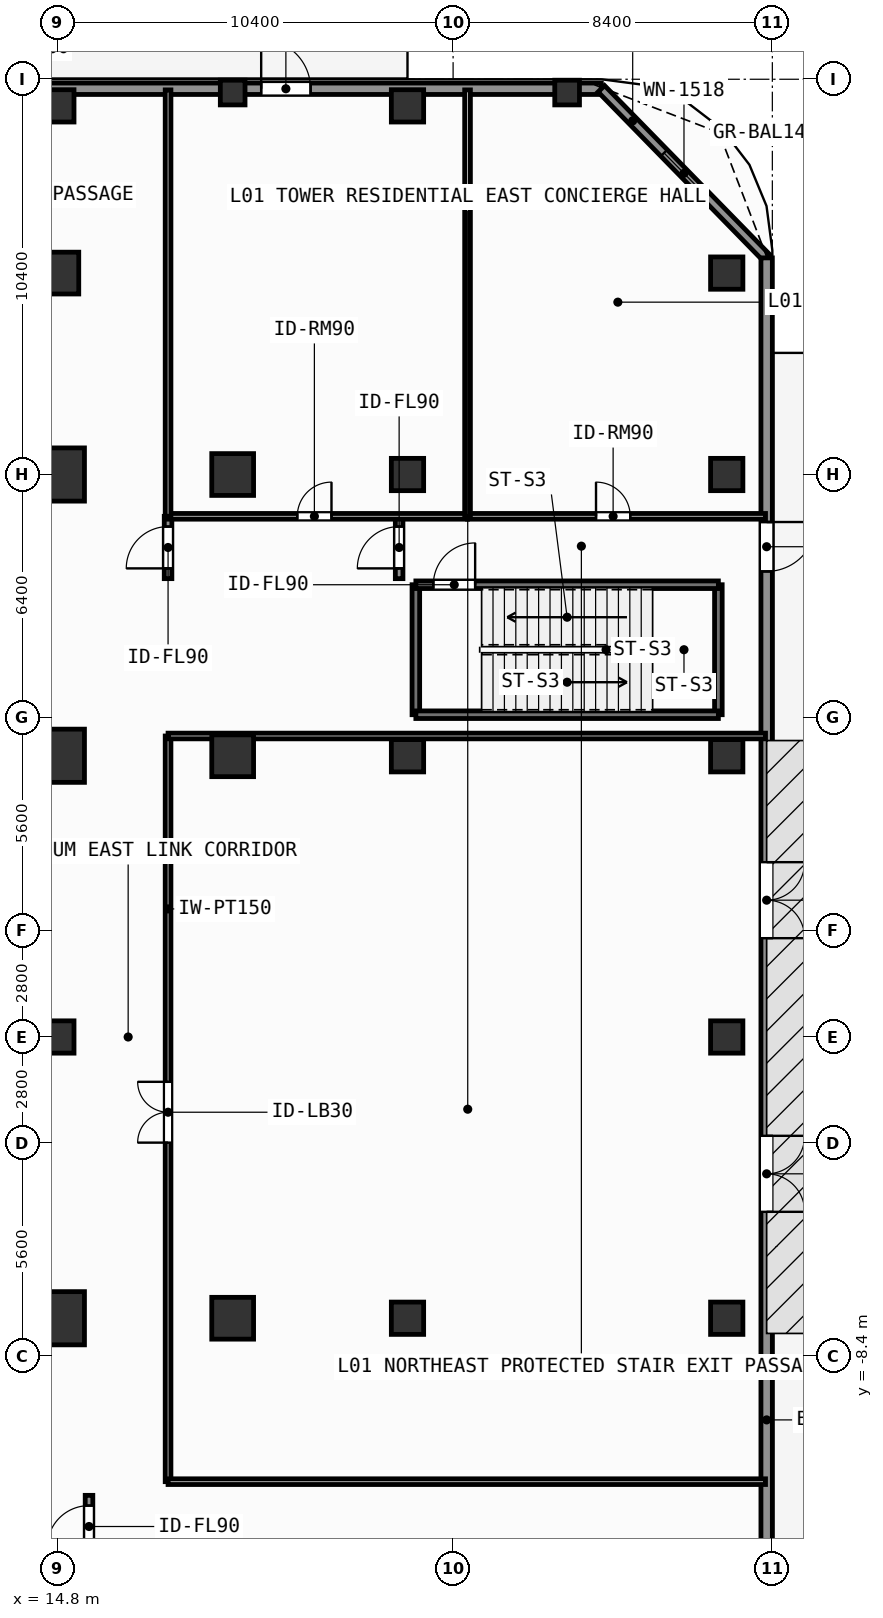
"""IFC4 building model, lengths in metres.
Left out: names, types, materials, properties, quantities, classifications, styles, units other than length and angle.
Written with IfcOpenShell. Run it as: python <this file> out.ifc"""

import sys

from ifc_helpers import new_model, si_unit, direction, frame, frame_2d, origin, origin_2d, place, context, subcontext, project, spatial, rectangle, extrude, element, fill, save


model = new_model("IFC4")
c1 = context("Model", 3, precision=1e-05, world=origin(), true_north=direction((0.0, 1.0)))
c2 = subcontext(c1, "Body", "Model", "MODEL_VIEW")
j1 = project(units=[si_unit("LENGTHUNIT", "METRE"), si_unit("PLANEANGLEUNIT", "RADIAN")], contexts=[c1])
p1 = place(None, origin())
s1 = spatial("IfcSite", under=j1, at=p1, CompositionType="ELEMENT")
p2 = place(p1, origin())
s2 = spatial("IfcBuilding", under=s1, at=p2, CompositionType="ELEMENT")
p3 = place(p2, origin())
s3 = spatial("IfcBuildingStorey", under=s2, at=p3, CompositionType="ELEMENT", Elevation=0.0)
for number, where, z_axis, x_axis in (
    (1, (14.8, 14.8, 0.0), (0.0, 0.0, 1.0), (1.0, 0.0, 0.0)),
    (2, (14.8, -7.4, 0.0), (0.0, 0.0, 1.0), (1.0, 0.0, 0.0)),
    (3, (14.8, 7.4, 0.0), (0.0, 0.0, 1.0), (1.0, 0.0, 0.0)),
):
    element("IfcColumn", number, at=place(p3, frame(where, z_axis=z_axis, x_axis=x_axis)), inside=s3, PredefinedType="COLUMN", context=c2, shape_type="SweptSolid", body=[
        extrude(rectangle(XDim=1.4, YDim=1.4, at=origin_2d()), origin(), (0.0, 0.0, 1.0), 4.8),
    ])
for number, where, z_axis, x_axis in (
    (4, (19.4, -7.4, 0.0), (0.0, 0.0, 1.0), (1.0, 0.0, 0.0)),
    (5, (19.4, 7.4, 0.0), (0.0, 0.0, 1.0), (1.0, 0.0, 0.0)),
    (6, (19.4, 14.8, 0.0), (0.0, 0.0, 1.0), (1.0, 0.0, 0.0)),
    (7, (14.8, 20.1, 0.0), (0.0, 0.0, 1.0), (1.0, 0.0, 0.0)),
):
    element("IfcColumn", number, at=place(p3, frame(where, z_axis=z_axis, x_axis=x_axis)), inside=s3, PredefinedType="COLUMN", context=c2, shape_type="SweptSolid", body=[
        extrude(rectangle(XDim=1.1, YDim=1.1, at=origin_2d()), origin(), (0.0, 0.0, 1.0), 4.8),
    ])
for number, where, z_axis, x_axis in (
    (8, (14.8, 0.0, 0.0), (0.0, 0.0, 1.0), (1.0, 0.0, 0.0)),
    (9, (14.8, 24.5, 0.0), (0.0, 0.0, 1.0), (1.0, 0.0, 0.0)),
    (10, (24.0, -7.4, 0.0), (0.0, 0.0, 1.0), (1.0, 0.0, 0.0)),
    (11, (24.0, 7.4, 0.0), (0.0, 0.0, 1.0), (1.0, 0.0, 0.0)),
    (12, (24.0, 14.8, 0.0), (0.0, 0.0, 1.0), (1.0, 0.0, 0.0)),
    (13, (24.0, 24.5, 0.0), (0.0, 0.0, 1.0), (1.0, 0.0, 0.0)),
    (14, (32.4, -7.4, 0.0), (0.0, 0.0, 1.0), (1.0, 0.0, 0.0)),
    (15, (32.4, 0.0, 0.0), (0.0, 0.0, 1.0), (1.0, 0.0, 0.0)),
    (16, (32.4, 7.4, 0.0), (0.0, 0.0, 1.0), (1.0, 0.0, 0.0)),
    (17, (32.4, 14.8, 0.0), (0.0, 0.0, 1.0), (1.0, 0.0, 0.0)),
    (18, (32.4, 20.1, 0.0), (0.0, 0.0, 1.0), (1.0, 0.0, 0.0)),
):
    element("IfcColumn", number, at=place(p3, frame(where, z_axis=z_axis, x_axis=x_axis)), inside=s3, PredefinedType="COLUMN", context=c2, shape_type="SweptSolid", body=[
        extrude(rectangle(XDim=0.85, YDim=0.85, at=origin_2d()), origin(), (0.0, 0.0, 1.0), 4.8),
    ])
for number, where, z_axis, x_axis in (
    (19, (19.4, 24.85, 0.0), (0.0, 0.0, 1.0), (1.0, 0.0, 0.0)),
    (20, (28.2, 24.85, 0.0), (0.0, 0.0, 1.0), (1.0, 0.0, 0.0)),
):
    element("IfcColumn", number, at=place(p3, frame(where, z_axis=z_axis, x_axis=x_axis)), inside=s3, PredefinedType="PILASTER", context=c2, shape_type="SweptSolid", body=[
        extrude(rectangle(XDim=0.65, YDim=0.65, at=origin_2d()), origin(), (0.0, 0.0, 1.0), 4.8),
    ])
p4 = place(p3, frame((-29.1, 24.95, 0.0), z_axis=(0.0, 0.0, 1.0), x_axis=(1.0, 0.0, 0.0)))
e21 = element("IfcWall", 21, at=p4, inside=s3, PredefinedType="SOLIDWALL", context=c2, shape_type="SweptSolid", body=[
    extrude(rectangle(XDim=58.2, YDim=0.3, at=frame_2d((29.1, 0.0))), origin(), (0.0, 0.0, 1.0), 4.56),
])
p5 = place(p4, frame((10.9, 0.0, 0.85)))
e22 = element("IfcOpeningElement", 22, at=p5, cuts=e21, PredefinedType="OPENING", context=c2, shape_type="SweptSolid", body=[
    extrude(rectangle(XDim=2.1, YDim=2.2, at=frame_2d((1.05, 1.1))), frame((0.0, 0.16, 0.0), z_axis=(0.0, -1.0, 0.0), x_axis=(1.0, 0.0, 0.0)), (0.0, 0.0, 1.0), 0.32),
])
p6 = place(p4, frame((16.95, 0.0, 0.85)))
e23 = element("IfcOpeningElement", 23, at=p6, cuts=e21, PredefinedType="OPENING", context=c2, shape_type="SweptSolid", body=[
    extrude(rectangle(XDim=2.1, YDim=2.2, at=frame_2d((1.05, 1.1))), frame((0.0, 0.16, 0.0), z_axis=(0.0, -1.0, 0.0), x_axis=(1.0, 0.0, 0.0)), (0.0, 0.0, 1.0), 0.32),
])
p7 = place(p4, frame((23.84, 0.0, 0.85)))
e24 = element("IfcOpeningElement", 24, at=p7, cuts=e21, PredefinedType="OPENING", context=c2, shape_type="SweptSolid", body=[
    extrude(rectangle(XDim=2.1, YDim=2.2, at=frame_2d((1.05, 1.1))), frame((0.0, 0.16, 0.0), z_axis=(0.0, -1.0, 0.0), x_axis=(1.0, 0.0, 0.0)), (0.0, 0.0, 1.0), 0.32),
])
p8 = place(p4, frame((30.44, 0.0, 0.85)))
e25 = element("IfcOpeningElement", 25, at=p8, cuts=e21, PredefinedType="OPENING", context=c2, shape_type="SweptSolid", body=[
    extrude(rectangle(XDim=2.1, YDim=2.2, at=frame_2d((1.05, 1.1))), frame((0.0, 0.16, 0.0), z_axis=(0.0, -1.0, 0.0), x_axis=(1.0, 0.0, 0.0)), (0.0, 0.0, 1.0), 0.32),
])
p9 = place(p4, frame((39.25, 0.0, 0.0)))
e26 = element("IfcOpeningElement", 26, at=p9, cuts=e21, PredefinedType="OPENING", context=c2, shape_type="SweptSolid", body=[
    extrude(rectangle(XDim=1.3, YDim=2.2, at=frame_2d((0.65, 1.1))), frame((0.0, 0.16, 0.0), z_axis=(0.0, -1.0, 0.0), x_axis=(1.0, 0.0, 0.0)), (0.0, 0.0, 1.0), 0.32),
])
p10 = place(p4, frame((49.25, 0.0, 0.0)))
e27 = element("IfcOpeningElement", 27, at=p10, cuts=e21, PredefinedType="OPENING", context=c2, shape_type="SweptSolid", body=[
    extrude(rectangle(XDim=1.3, YDim=2.2, at=frame_2d((0.65, 1.1))), frame((0.0, 0.16, 0.0), z_axis=(0.0, -1.0, 0.0), x_axis=(1.0, 0.0, 0.0)), (0.0, 0.0, 1.0), 0.32),
])
p11 = place(p3, frame((29.1, 24.95, 0.0), z_axis=(0.0, 0.0, 1.0), x_axis=(0.69901822973, -0.715103848756, 0.0)))
e28 = element("IfcWall", 28, at=p11, inside=s3, PredefinedType="SOLIDWALL", context=c2, shape_type="SweptSolid", body=[
    extrude(rectangle(XDim=6.223, YDim=0.24, at=frame_2d((3.111, 0.0))), origin(), (0.0, 0.0, 1.0), 4.56),
])
p12 = place(p11, frame((2.362, 0.0, 0.85)))
e29 = element("IfcOpeningElement", 29, at=p12, cuts=e28, PredefinedType="OPENING", context=c2, shape_type="SweptSolid", body=[
    extrude(rectangle(XDim=1.5, YDim=1.85, at=frame_2d((0.75, 0.925))), frame((0.0, 0.13, 0.0), z_axis=(0.0, -1.0, 0.0), x_axis=(1.0, 0.0, 0.0)), (0.0, 0.0, 1.0), 0.26),
])
p13 = place(p3, frame((33.45, 20.5, 0.0), z_axis=(0.0, 0.0, 1.0), x_axis=(0.0, -1.0, 0.0)))
e30 = element("IfcWall", 30, at=p13, inside=s3, PredefinedType="SOLIDWALL", context=c2, shape_type="SweptSolid", body=[
    extrude(rectangle(XDim=41.0, YDim=0.3, at=frame_2d((20.5, 0.0))), origin(), (0.0, 0.0, 1.0), 4.56),
])
p14 = place(p13, frame((23.1, 0.0, 0.0)))
e31 = element("IfcOpeningElement", 31, at=p14, cuts=e30, PredefinedType="OPENING", context=c2, shape_type="SweptSolid", body=[
    extrude(rectangle(XDim=2.0, YDim=2.4, at=frame_2d((1.0, 1.2))), frame((0.0, 0.16, 0.0), z_axis=(0.0, -1.0, 0.0), x_axis=(1.0, 0.0, 0.0)), (0.0, 0.0, 1.0), 0.32),
])
p15 = place(p13, frame((15.9, 0.0, 0.0)))
e32 = element("IfcOpeningElement", 32, at=p15, cuts=e30, PredefinedType="OPENING", context=c2, shape_type="SweptSolid", body=[
    extrude(rectangle(XDim=2.0, YDim=2.4, at=frame_2d((1.0, 1.2))), frame((0.0, 0.16, 0.0), z_axis=(0.0, -1.0, 0.0), x_axis=(1.0, 0.0, 0.0)), (0.0, 0.0, 1.0), 0.32),
])
p16 = place(p13, frame((36.05, 0.0, 0.0)))
e33 = element("IfcOpeningElement", 33, at=p16, cuts=e30, PredefinedType="OPENING", context=c2, shape_type="SweptSolid", body=[
    extrude(rectangle(XDim=4.6, YDim=2.6, at=frame_2d((2.3, 1.3))), frame((0.0, 0.16, 0.0), z_axis=(0.0, -1.0, 0.0), x_axis=(1.0, 0.0, 0.0)), (0.0, 0.0, 1.0), 0.32),
])
p17 = place(p13, frame((6.95, 0.0, 0.0)))
e34 = element("IfcOpeningElement", 34, at=p17, cuts=e30, PredefinedType="OPENING", context=c2, shape_type="SweptSolid", body=[
    extrude(rectangle(XDim=1.3, YDim=2.2, at=frame_2d((0.65, 1.1))), frame((0.0, 0.16, 0.0), z_axis=(0.0, -1.0, 0.0), x_axis=(1.0, 0.0, 0.0)), (0.0, 0.0, 1.0), 0.32),
])
for number, where, z_axis, x_axis in (
    (35, (24.22, 8.48, 0.0), (0.0, 0.0, 1.0), (0.0, 1.0, 0.0)),
    (36, (32.18, 11.9, 0.0), (0.0, 0.0, 1.0), (0.0, -1.0, 0.0)),
):
    element("IfcWall", number, at=place(p3, frame(where, z_axis=z_axis, x_axis=x_axis)), inside=s3, PredefinedType="SHEAR", context=c2, shape_type="SweptSolid", body=[
        extrude(rectangle(XDim=3.42, YDim=0.2, at=frame_2d((1.71, 0.0))), origin(), (0.0, 0.0, 1.0), 4.56),
    ])
p18 = place(p3, frame((32.18, 8.48, 0.0), z_axis=(0.0, 0.0, 1.0), x_axis=(-1.0, 0.0, 0.0)))
e37 = element("IfcWall", 37, at=p18, inside=s3, PredefinedType="SHEAR", context=c2, shape_type="SweptSolid", body=[
    extrude(rectangle(XDim=7.96, YDim=0.2, at=frame_2d((3.98, 0.0))), origin(), (0.0, 0.0, 1.0), 4.56),
])
p19 = place(p3, frame((24.22, 11.9, 0.0), z_axis=(0.0, 0.0, 1.0), x_axis=(1.0, 0.0, 0.0)))
e38 = element("IfcWall", 38, at=p19, inside=s3, PredefinedType="SHEAR", context=c2, shape_type="SweptSolid", body=[
    extrude(rectangle(XDim=7.96, YDim=0.2, at=frame_2d((3.98, 0.0))), origin(), (0.0, 0.0, 1.0), 4.56),
])
p20 = place(p19, frame((0.46, 0.0, 0.0)))
e39 = element("IfcOpeningElement", 39, at=p20, cuts=e38, PredefinedType="OPENING", context=c2, shape_type="SweptSolid", body=[
    extrude(rectangle(XDim=1.1, YDim=2.15, at=frame_2d((0.55, 1.075))), frame((0.0, 0.11, 0.0), z_axis=(0.0, -1.0, 0.0), x_axis=(1.0, 0.0, 0.0)), (0.0, 0.0, 1.0), 0.22),
])
p21 = place(p3, frame((23.78, 12.06, 0.0), z_axis=(0.0, 0.0, 1.0), x_axis=(0.0, 1.0, 0.0)))
e40 = element("IfcWall", 40, at=p21, inside=s3, PredefinedType="SOLIDWALL", context=c2, shape_type="SweptSolid", body=[
    extrude(rectangle(XDim=1.64, YDim=0.2, at=frame_2d((0.82, 0.0))), origin(), (0.0, 0.0, 1.0), 3.85),
])
p22 = place(p21, frame((0.27, 0.0, 0.0)))
e41 = element("IfcOpeningElement", 41, at=p22, cuts=e40, PredefinedType="OPENING", context=c2, shape_type="SweptSolid", body=[
    extrude(rectangle(XDim=1.1, YDim=2.15, at=frame_2d((0.55, 1.075))), frame((0.0, 0.11, 0.0), z_axis=(0.0, -1.0, 0.0), x_axis=(1.0, 0.0, 0.0)), (0.0, 0.0, 1.0), 0.22),
])
p23 = place(p3, frame((15.62, -13.7, 0.0), z_axis=(0.0, 0.0, 1.0), x_axis=(0.0, 1.0, 0.0)))
e42 = element("IfcWall", 42, at=p23, inside=s3, PredefinedType="SOLIDWALL", context=c2, shape_type="SweptSolid", body=[
    extrude(rectangle(XDim=1.64, YDim=0.2, at=frame_2d((0.82, 0.0))), origin(), (0.0, 0.0, 1.0), 4.56),
])
p24 = place(p23, frame((0.27, 0.0, 0.0)))
e43 = element("IfcOpeningElement", 43, at=p24, cuts=e42, PredefinedType="OPENING", context=c2, shape_type="SweptSolid", body=[
    extrude(rectangle(XDim=1.1, YDim=2.15, at=frame_2d((0.55, 1.075))), frame((0.0, 0.11, 0.0), z_axis=(0.0, -1.0, 0.0), x_axis=(1.0, 0.0, 0.0)), (0.0, 0.0, 1.0), 0.22),
])
p25 = place(p3, frame((17.7, 12.06, 0.0), z_axis=(0.0, 0.0, 1.0), x_axis=(0.0, 1.0, 0.0)))
e44 = element("IfcWall", 44, at=p25, inside=s3, PredefinedType="SOLIDWALL", context=c2, shape_type="SweptSolid", body=[
    extrude(rectangle(XDim=1.64, YDim=0.2, at=frame_2d((0.82, 0.0))), origin(), (0.0, 0.0, 1.0), 4.56),
])
p26 = place(p25, frame((0.27, 0.0, 0.0)))
e45 = element("IfcOpeningElement", 45, at=p26, cuts=e44, PredefinedType="OPENING", context=c2, shape_type="SweptSolid", body=[
    extrude(rectangle(XDim=1.1, YDim=2.15, at=frame_2d((0.55, 1.075))), frame((0.0, 0.11, 0.0), z_axis=(0.0, -1.0, 0.0), x_axis=(1.0, 0.0, 0.0)), (0.0, 0.0, 1.0), 0.22),
])
p27 = place(p3, frame((17.7, 13.7, 0.0), z_axis=(0.0, 0.0, 1.0), x_axis=(1.0, 0.0, 0.0)))
e46 = element("IfcWall", 46, at=p27, inside=s3, PredefinedType="PARTITIONING", context=c2, shape_type="SweptSolid", body=[
    extrude(rectangle(XDim=7.88, YDim=0.15, at=frame_2d((3.94, 0.0))), origin(), (0.0, 0.0, 1.0), 4.56),
])
p28 = place(p27, frame((3.4, 0.0, 0.0)))
e47 = element("IfcOpeningElement", 47, at=p28, cuts=e46, PredefinedType="OPENING", context=c2, shape_type="SweptSolid", body=[
    extrude(rectangle(XDim=0.9, YDim=2.1, at=frame_2d((0.45, 1.05))), frame((0.0, 0.085, 0.0), z_axis=(0.0, -1.0, 0.0), x_axis=(1.0, 0.0, 0.0)), (0.0, 0.0, 1.0), 0.17),
])
p29 = place(p3, frame((25.58, 13.7, 0.0), z_axis=(0.0, 0.0, 1.0), x_axis=(1.0, 0.0, 0.0)))
e48 = element("IfcWall", 48, at=p29, inside=s3, PredefinedType="PARTITIONING", context=c2, shape_type="SweptSolid", body=[
    extrude(rectangle(XDim=7.84, YDim=0.15, at=frame_2d((3.92, 0.0))), origin(), (0.0, 0.0, 1.0), 4.56),
])
p30 = place(p29, frame((3.381, 0.0, 0.0)))
e49 = element("IfcOpeningElement", 49, at=p30, cuts=e48, PredefinedType="OPENING", context=c2, shape_type="SweptSolid", body=[
    extrude(rectangle(XDim=0.9, YDim=2.1, at=frame_2d((0.45, 1.05))), frame((0.0, 0.085, 0.0), z_axis=(0.0, -1.0, 0.0), x_axis=(1.0, 0.0, 0.0)), (0.0, 0.0, 1.0), 0.17),
])
p31 = place(p3, frame((17.7, -11.7, 0.0), z_axis=(0.0, 0.0, 1.0), x_axis=(0.0, 1.0, 0.0)))
e50 = element("IfcWall", 50, at=p31, inside=s3, PredefinedType="PARTITIONING", context=c2, shape_type="SweptSolid", body=[
    extrude(rectangle(XDim=19.62, YDim=0.15, at=frame_2d((9.81, 0.0))), origin(), (0.0, 0.0, 1.0), 4.56),
])
p32 = place(p31, frame((8.921, 0.0, 0.0)))
e51 = element("IfcOpeningElement", 51, at=p32, cuts=e50, PredefinedType="OPENING", context=c2, shape_type="SweptSolid", body=[
    extrude(rectangle(XDim=1.6, YDim=2.3, at=frame_2d((0.8, 1.15))), frame((0.0, 0.085, 0.0), z_axis=(0.0, -1.0, 0.0), x_axis=(1.0, 0.0, 0.0)), (0.0, 0.0, 1.0), 0.17),
])
for number, where, z_axis, x_axis in (
    (52, (17.7, 13.7, 0.0), (0.0, 0.0, 1.0), (0.0, 1.0, 0.0)),
    (53, (25.58, 13.7, 0.0), (0.0, 0.0, 1.0), (0.0, 1.0, 0.0)),
):
    element("IfcWall", number, at=place(p3, frame(where, z_axis=z_axis, x_axis=x_axis)), inside=s3, PredefinedType="PARTITIONING", context=c2, shape_type="SweptSolid", body=[
        extrude(rectangle(XDim=11.22, YDim=0.15, at=frame_2d((5.61, 0.0))), origin(), (0.0, 0.0, 1.0), 4.56),
    ])
for number, where, z_axis, x_axis in (
    (54, (17.7, 7.92, 0.0), (0.0, 0.0, 1.0), (1.0, 0.0, 0.0)),
    (55, (17.7, -11.7, 0.0), (0.0, 0.0, 1.0), (1.0, 0.0, 0.0)),
):
    element("IfcWall", number, at=place(p3, frame(where, z_axis=z_axis, x_axis=x_axis)), inside=s3, PredefinedType="PARTITIONING", context=c2, shape_type="SweptSolid", body=[
        extrude(rectangle(XDim=15.72, YDim=0.15, at=frame_2d((7.86, 0.0))), origin(), (0.0, 0.0, 1.0), 4.56),
    ])
p33 = place(p12, origin())
e56 = element("IfcWindow", 56, at=p33, inside=s3, PartitioningType="SINGLE_PANEL", PredefinedType="WINDOW", context=c2, shape_type="SweptSolid", body=[
    extrude(rectangle(XDim=1.5, YDim=1.85, at=frame_2d((0.75, 0.925))), frame((0.0, 0.03, 0.0), z_axis=(0.0, -1.0, 0.0), x_axis=(1.0, 0.0, 0.0)), (0.0, 0.0, 1.0), 0.06),
])
fill(e29, e56)
p34 = place(p14, origin())
e57 = element("IfcDoor", 57, at=p34, inside=s3, OperationType="SINGLE_SWING_LEFT", PredefinedType="DOOR", context=c2, shape_type="SweptSolid", body=[
    extrude(rectangle(XDim=2.0, YDim=2.4, at=frame_2d((1.0, 1.2))), frame((0.0, 0.025, 0.0), z_axis=(0.0, -1.0, 0.0), x_axis=(1.0, 0.0, 0.0)), (0.0, 0.0, 1.0), 0.05),
])
fill(e31, e57)
p35 = place(p15, origin())
e58 = element("IfcDoor", 58, at=p35, inside=s3, OperationType="SINGLE_SWING_LEFT", PredefinedType="DOOR", context=c2, shape_type="SweptSolid", body=[
    extrude(rectangle(XDim=2.0, YDim=2.4, at=frame_2d((1.0, 1.2))), frame((0.0, 0.025, 0.0), z_axis=(0.0, -1.0, 0.0), x_axis=(1.0, 0.0, 0.0)), (0.0, 0.0, 1.0), 0.05),
])
fill(e32, e58)
p36 = place(p17, origin())
e59 = element("IfcDoor", 59, at=p36, inside=s3, OperationType="SINGLE_SWING_LEFT", PredefinedType="DOOR", context=c2, shape_type="SweptSolid", body=[
    extrude(rectangle(XDim=1.3, YDim=2.2, at=frame_2d((0.65, 1.1))), frame((0.0, 0.025, 0.0), z_axis=(0.0, -1.0, 0.0), x_axis=(1.0, 0.0, 0.0)), (0.0, 0.0, 1.0), 0.05),
])
fill(e34, e59)
p37 = place(p10, origin())
e60 = element("IfcDoor", 60, at=p37, inside=s3, OperationType="SINGLE_SWING_LEFT", PredefinedType="DOOR", context=c2, shape_type="SweptSolid", body=[
    extrude(rectangle(XDim=1.3, YDim=2.2, at=frame_2d((0.65, 1.1))), frame((0.0, 0.025, 0.0), z_axis=(0.0, -1.0, 0.0), x_axis=(1.0, 0.0, 0.0)), (0.0, 0.0, 1.0), 0.05),
])
fill(e27, e60)
p38 = place(p20, origin())
e61 = element("IfcDoor", 61, at=p38, inside=s3, OperationType="SINGLE_SWING_RIGHT", PredefinedType="DOOR", context=c2, shape_type="SweptSolid", body=[
    extrude(rectangle(XDim=1.1, YDim=2.15, at=frame_2d((0.55, 1.075))), frame((0.0, 0.025, 0.0), z_axis=(0.0, -1.0, 0.0), x_axis=(1.0, 0.0, 0.0)), (0.0, 0.0, 1.0), 0.05),
])
fill(e39, e61)
p39 = place(p22, origin())
e62 = element("IfcDoor", 62, at=p39, inside=s3, OperationType="SINGLE_SWING_LEFT", PredefinedType="DOOR", context=c2, shape_type="SweptSolid", body=[
    extrude(rectangle(XDim=1.1, YDim=2.15, at=frame_2d((0.55, 1.075))), frame((0.0, 0.025, 0.0), z_axis=(0.0, -1.0, 0.0), x_axis=(1.0, 0.0, 0.0)), (0.0, 0.0, 1.0), 0.05),
])
fill(e41, e62)
p40 = place(p24, origin())
e63 = element("IfcDoor", 63, at=p40, inside=s3, OperationType="SINGLE_SWING_LEFT", PredefinedType="DOOR", context=c2, shape_type="SweptSolid", body=[
    extrude(rectangle(XDim=1.1, YDim=2.15, at=frame_2d((0.55, 1.075))), frame((0.0, 0.025, 0.0), z_axis=(0.0, -1.0, 0.0), x_axis=(1.0, 0.0, 0.0)), (0.0, 0.0, 1.0), 0.05),
])
fill(e43, e63)
p41 = place(p26, origin())
e64 = element("IfcDoor", 64, at=p41, inside=s3, OperationType="SINGLE_SWING_LEFT", PredefinedType="DOOR", context=c2, shape_type="SweptSolid", body=[
    extrude(rectangle(XDim=1.1, YDim=2.15, at=frame_2d((0.55, 1.075))), frame((0.0, 0.025, 0.0), z_axis=(0.0, -1.0, 0.0), x_axis=(1.0, 0.0, 0.0)), (0.0, 0.0, 1.0), 0.05),
])
fill(e45, e64)
p42 = place(p28, origin())
e65 = element("IfcDoor", 65, at=p42, inside=s3, OperationType="SINGLE_SWING_RIGHT", PredefinedType="DOOR", context=c2, shape_type="SweptSolid", body=[
    extrude(rectangle(XDim=0.9, YDim=2.1, at=frame_2d((0.45, 1.05))), frame((0.0, 0.025, 0.0), z_axis=(0.0, -1.0, 0.0), x_axis=(1.0, 0.0, 0.0)), (0.0, 0.0, 1.0), 0.05),
])
fill(e47, e65)
p43 = place(p30, origin())
e66 = element("IfcDoor", 66, at=p43, inside=s3, OperationType="SINGLE_SWING_LEFT", PredefinedType="DOOR", context=c2, shape_type="SweptSolid", body=[
    extrude(rectangle(XDim=0.9, YDim=2.1, at=frame_2d((0.45, 1.05))), frame((0.0, 0.025, 0.0), z_axis=(0.0, -1.0, 0.0), x_axis=(1.0, 0.0, 0.0)), (0.0, 0.0, 1.0), 0.05),
])
fill(e49, e66)
p44 = place(p32, origin())
e67 = element("IfcDoor", 67, at=p44, inside=s3, OperationType="SINGLE_SWING_LEFT", PredefinedType="DOOR", context=c2, shape_type="SweptSolid", body=[
    extrude(rectangle(XDim=1.6, YDim=2.3, at=frame_2d((0.8, 1.15))), frame((0.0, 0.025, 0.0), z_axis=(0.0, -1.0, 0.0), x_axis=(1.0, 0.0, 0.0)), (0.0, 0.0, 1.0), 0.05),
])
fill(e51, e67)
save(model, sys.argv[1])
